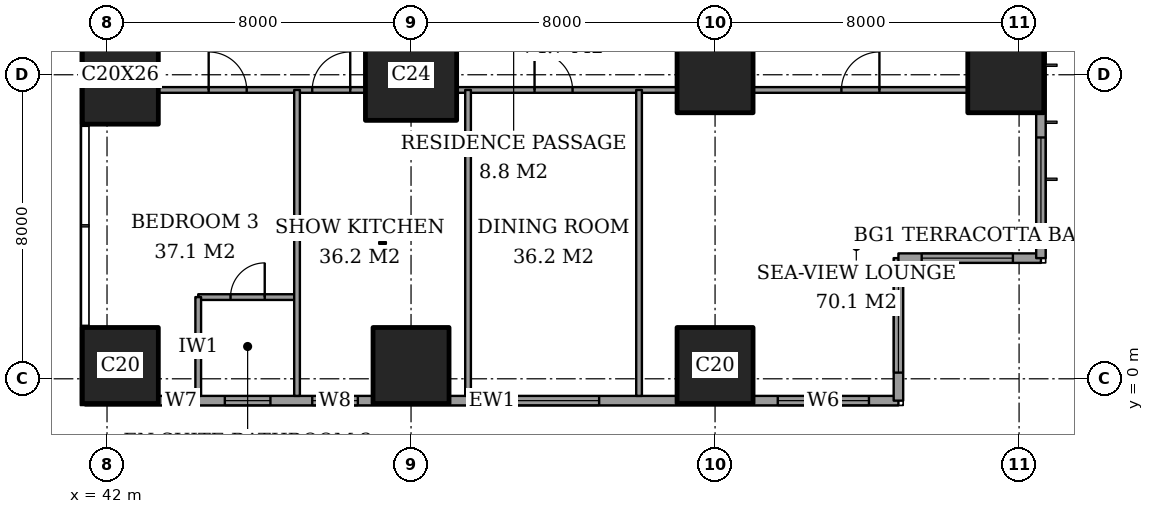
"""IFC4 building model, lengths in metres.
Left out: names, types, materials, properties, quantities, classifications, styles, units other than length and angle.
Written with IfcOpenShell. Run it as: python <this file> out.ifc"""

import sys

from ifc_helpers import new_model, si_unit, direction, frame, frame_2d, origin, origin_2d, place, context, subcontext, project, spatial, rectangle, extrude, element, fill, save


model = new_model("IFC4")
c1 = context("Model", 3, precision=1e-05, world=origin(), true_north=direction((0.0, 1.0)))
c2 = subcontext(c1, "Body", "Model", "MODEL_VIEW")
j1 = project(units=[si_unit("LENGTHUNIT", "METRE"), si_unit("PLANEANGLEUNIT", "RADIAN")], contexts=[c1])
p1 = place(None, origin())
s1 = spatial("IfcSite", under=j1, at=p1, CompositionType="ELEMENT")
p2 = place(p1, origin())
s2 = spatial("IfcBuilding", under=s1, at=p2, CompositionType="ELEMENT")
p3 = place(p2, frame((0.0, 0.0, 36.8)))
s3 = spatial("IfcBuildingStorey", under=s2, at=p3, CompositionType="ELEMENT", Elevation=36.8)
p4 = place(p3, frame((42.35, 0.35, 0.0), z_axis=(0.0, 0.0, 1.0), x_axis=(1.0, 0.0, 0.0)))
e1 = element("IfcColumn", 1, at=p4, inside=s3, PredefinedType="COLUMN", context=c2, shape_type="SweptSolid", body=[
    extrude(rectangle(XDim=2.0, YDim=2.0, at=origin_2d()), origin(), (0.0, 0.0, 1.0), 3.6),
])
p5 = place(p3, frame((42.35, 8.0, 0.0), z_axis=(0.0, 0.0, 1.0), x_axis=(1.0, 0.0, 0.0)))
e2 = element("IfcColumn", 2, at=p5, inside=s3, PredefinedType="COLUMN", context=c2, shape_type="SweptSolid", body=[
    extrude(rectangle(XDim=2.0, YDim=2.6, at=origin_2d()), origin(), (0.0, 0.0, 1.0), 3.6),
])
p6 = place(p3, frame((50.0, 0.35, 0.0), z_axis=(0.0, 0.0, 1.0), x_axis=(1.0, 0.0, 0.0)))
e3 = element("IfcColumn", 3, at=p6, inside=s3, PredefinedType="COLUMN", context=c2, shape_type="SweptSolid", body=[
    extrude(rectangle(XDim=2.0, YDim=2.0, at=origin_2d()), origin(), (0.0, 0.0, 1.0), 3.6),
])
p7 = place(p3, frame((50.0, 8.0, 0.0), z_axis=(0.0, 0.0, 1.0), x_axis=(1.0, 0.0, 0.0)))
e4 = element("IfcColumn", 4, at=p7, inside=s3, PredefinedType="COLUMN", context=c2, shape_type="SweptSolid", body=[
    extrude(rectangle(XDim=2.4, YDim=2.4, at=origin_2d()), origin(), (0.0, 0.0, 1.0), 3.6),
])
for number, where, z_axis, x_axis in (
    (5, (58.0, 0.35, 0.0), (0.0, 0.0, 1.0), (1.0, 0.0, 0.0)),
    (6, (58.0, 8.0, 0.0), (0.0, 0.0, 1.0), (1.0, 0.0, 0.0)),
    (7, (65.65, 8.0, 0.0), (0.0, 0.0, 1.0), (1.0, 0.0, 0.0)),
):
    element("IfcColumn", number, at=place(p3, frame(where, z_axis=z_axis, x_axis=x_axis)), inside=s3, PredefinedType="COLUMN", context=c2, shape_type="SweptSolid", body=[
        extrude(rectangle(XDim=2.0, YDim=2.0, at=origin_2d()), origin(), (0.0, 0.0, 1.0), 3.6),
    ])
p8 = place(p3, frame((41.425, -0.575, 0.0), z_axis=(0.0, 0.0, 1.0), x_axis=(1.0, 0.0, 0.0)))
e8 = element("IfcWall", 8, at=p8, inside=s3, PredefinedType="SOLIDWALL", context=c2, shape_type="SweptSolid", body=[
    extrude(rectangle(XDim=21.4, YDim=0.25, at=frame_2d((10.7, 0.0))), origin(), (0.0, 0.0, 1.0), 3.6),
])
p9 = place(p8, frame((2.225, 0.0, 0.6)))
e9 = element("IfcOpeningElement", 9, at=p9, cuts=e8, PredefinedType="OPENING", context=c2, shape_type="SweptSolid", body=[
    extrude(rectangle(XDim=0.6, YDim=2.0, at=frame_2d((0.3, 1.0))), frame((0.0, 0.135, 0.0), z_axis=(0.0, -1.0, 0.0), x_axis=(1.0, 0.0, 0.0)), (0.0, 0.0, 1.0), 0.27),
])
p10 = place(p8, frame((3.675, 0.0, 0.6)))
e10 = element("IfcOpeningElement", 10, at=p10, cuts=e8, PredefinedType="OPENING", context=c2, shape_type="SweptSolid", body=[
    extrude(rectangle(XDim=1.2, YDim=2.0, at=frame_2d((0.6, 1.0))), frame((0.0, 0.135, 0.0), z_axis=(0.0, -1.0, 0.0), x_axis=(1.0, 0.0, 0.0)), (0.0, 0.0, 1.0), 0.27),
])
p11 = place(p8, frame((5.975, 0.0, 0.6)))
e11 = element("IfcOpeningElement", 11, at=p11, cuts=e8, PredefinedType="OPENING", context=c2, shape_type="SweptSolid", body=[
    extrude(rectangle(XDim=1.2, YDim=2.0, at=frame_2d((0.6, 1.0))), frame((0.0, 0.135, 0.0), z_axis=(0.0, -1.0, 0.0), x_axis=(1.0, 0.0, 0.0)), (0.0, 0.0, 1.0), 0.27),
])
p12 = place(p8, frame((11.125, 0.0, 0.6)))
e12 = element("IfcOpeningElement", 12, at=p12, cuts=e8, PredefinedType="OPENING", context=c2, shape_type="SweptSolid", body=[
    extrude(rectangle(XDim=2.4, YDim=2.0, at=frame_2d((1.2, 1.0))), frame((0.0, 0.135, 0.0), z_axis=(0.0, -1.0, 0.0), x_axis=(1.0, 0.0, 0.0)), (0.0, 0.0, 1.0), 0.27),
])
p13 = place(p8, frame((18.225, 0.0, 0.6)))
e13 = element("IfcOpeningElement", 13, at=p13, cuts=e8, PredefinedType="OPENING", context=c2, shape_type="SweptSolid", body=[
    extrude(rectangle(XDim=2.4, YDim=2.0, at=frame_2d((1.2, 1.0))), frame((0.0, 0.135, 0.0), z_axis=(0.0, -1.0, 0.0), x_axis=(1.0, 0.0, 0.0)), (0.0, 0.0, 1.0), 0.27),
])
p14 = place(p3, frame((62.825, -0.575, 0.0), z_axis=(0.0, 0.0, 1.0), x_axis=(0.0, 1.0, 0.0)))
e14 = element("IfcWall", 14, at=p14, inside=s3, PredefinedType="SOLIDWALL", context=c2, shape_type="SweptSolid", body=[
    extrude(rectangle(XDim=3.75, YDim=0.25, at=frame_2d((1.875, 0.0))), origin(), (0.0, 0.0, 1.0), 3.6),
])
p15 = place(p14, frame((0.738, 0.0, 0.6)))
e15 = element("IfcOpeningElement", 15, at=p15, cuts=e14, PredefinedType="OPENING", context=c2, shape_type="SweptSolid", body=[
    extrude(rectangle(XDim=2.4, YDim=2.0, at=frame_2d((1.2, 1.0))), frame((0.0, 0.135, 0.0), z_axis=(0.0, -1.0, 0.0), x_axis=(1.0, 0.0, 0.0)), (0.0, 0.0, 1.0), 0.27),
])
p16 = place(p3, frame((62.825, 3.175, 0.0), z_axis=(0.0, 0.0, 1.0), x_axis=(1.0, 0.0, 0.0)))
e16 = element("IfcWall", 16, at=p16, inside=s3, PredefinedType="SOLIDWALL", context=c2, shape_type="SweptSolid", body=[
    extrude(rectangle(XDim=3.75, YDim=0.25, at=frame_2d((1.875, 0.0))), origin(), (0.0, 0.0, 1.0), 3.6),
])
p17 = place(p16, frame((0.613, 0.0, 0.6)))
e17 = element("IfcOpeningElement", 17, at=p17, cuts=e16, PredefinedType="OPENING", context=c2, shape_type="SweptSolid", body=[
    extrude(rectangle(XDim=2.4, YDim=2.0, at=frame_2d((1.2, 1.0))), frame((0.0, 0.135, 0.0), z_axis=(0.0, -1.0, 0.0), x_axis=(1.0, 0.0, 0.0)), (0.0, 0.0, 1.0), 0.27),
])
p18 = place(p3, frame((66.575, 3.175, 0.0), z_axis=(0.0, 0.0, 1.0), x_axis=(0.0, 1.0, 0.0)))
e18 = element("IfcWall", 18, at=p18, inside=s3, PredefinedType="SOLIDWALL", context=c2, shape_type="SweptSolid", body=[
    extrude(rectangle(XDim=41.65, YDim=0.25, at=frame_2d((20.825, 0.0))), origin(), (0.0, 0.0, 1.0), 3.6),
])
p19 = place(p18, frame((0.775, 0.0, 0.6)))
e19 = element("IfcOpeningElement", 19, at=p19, cuts=e18, PredefinedType="OPENING", context=c2, shape_type="SweptSolid", body=[
    extrude(rectangle(XDim=2.4, YDim=2.0, at=frame_2d((1.2, 1.0))), frame((0.0, 0.135, 0.0), z_axis=(0.0, -1.0, 0.0), x_axis=(1.0, 0.0, 0.0)), (0.0, 0.0, 1.0), 0.27),
])
p20 = place(p18, frame((6.1, 0.0, 0.6)))
e20 = element("IfcOpeningElement", 20, at=p20, cuts=e18, PredefinedType="OPENING", context=c2, shape_type="SweptSolid", body=[
    extrude(rectangle(XDim=1.2, YDim=2.0, at=frame_2d((0.6, 1.0))), frame((0.0, 0.135, 0.0), z_axis=(0.0, -1.0, 0.0), x_axis=(1.0, 0.0, 0.0)), (0.0, 0.0, 1.0), 0.27),
])
p21 = place(p18, frame((8.275, 0.0, 0.6)))
e21 = element("IfcOpeningElement", 21, at=p21, cuts=e18, PredefinedType="OPENING", context=c2, shape_type="SweptSolid", body=[
    extrude(rectangle(XDim=2.4, YDim=2.0, at=frame_2d((1.2, 1.0))), frame((0.0, 0.135, 0.0), z_axis=(0.0, -1.0, 0.0), x_axis=(1.0, 0.0, 0.0)), (0.0, 0.0, 1.0), 0.27),
])
p22 = place(p18, frame((15.775, 0.0, 0.6)))
e22 = element("IfcOpeningElement", 22, at=p22, cuts=e18, PredefinedType="OPENING", context=c2, shape_type="SweptSolid", body=[
    extrude(rectangle(XDim=2.4, YDim=2.0, at=frame_2d((1.2, 1.0))), frame((0.0, 0.135, 0.0), z_axis=(0.0, -1.0, 0.0), x_axis=(1.0, 0.0, 0.0)), (0.0, 0.0, 1.0), 0.27),
])
p23 = place(p18, frame((23.475, 0.0, 0.6)))
e23 = element("IfcOpeningElement", 23, at=p23, cuts=e18, PredefinedType="OPENING", context=c2, shape_type="SweptSolid", body=[
    extrude(rectangle(XDim=2.4, YDim=2.0, at=frame_2d((1.2, 1.0))), frame((0.0, 0.135, 0.0), z_axis=(0.0, -1.0, 0.0), x_axis=(1.0, 0.0, 0.0)), (0.0, 0.0, 1.0), 0.27),
])
p24 = place(p18, frame((30.975, 0.0, 0.6)))
e24 = element("IfcOpeningElement", 24, at=p24, cuts=e18, PredefinedType="OPENING", context=c2, shape_type="SweptSolid", body=[
    extrude(rectangle(XDim=2.4, YDim=2.0, at=frame_2d((1.2, 1.0))), frame((0.0, 0.135, 0.0), z_axis=(0.0, -1.0, 0.0), x_axis=(1.0, 0.0, 0.0)), (0.0, 0.0, 1.0), 0.27),
])
p25 = place(p18, frame((34.5, 0.0, 0.6)))
e25 = element("IfcOpeningElement", 25, at=p25, cuts=e18, PredefinedType="OPENING", context=c2, shape_type="SweptSolid", body=[
    extrude(rectangle(XDim=1.2, YDim=2.0, at=frame_2d((0.6, 1.0))), frame((0.0, 0.135, 0.0), z_axis=(0.0, -1.0, 0.0), x_axis=(1.0, 0.0, 0.0)), (0.0, 0.0, 1.0), 0.27),
])
p26 = place(p18, frame((38.475, 0.0, 0.6)))
e26 = element("IfcOpeningElement", 26, at=p26, cuts=e18, PredefinedType="OPENING", context=c2, shape_type="SweptSolid", body=[
    extrude(rectangle(XDim=2.4, YDim=2.0, at=frame_2d((1.2, 1.0))), frame((0.0, 0.135, 0.0), z_axis=(0.0, -1.0, 0.0), x_axis=(1.0, 0.0, 0.0)), (0.0, 0.0, 1.0), 0.27),
])
p27 = place(p3, frame((44.4, 2.15, 0.0), z_axis=(0.0, 0.0, 1.0), x_axis=(1.0, 0.0, 0.0)))
e27 = element("IfcWall", 27, at=p27, inside=s3, PredefinedType="PARTITIONING", context=c2, shape_type="SweptSolid", body=[
    extrude(rectangle(XDim=2.6, YDim=0.15, at=frame_2d((1.3, 0.0))), origin(), (0.0, 0.0, 1.0), 3.35),
])
p28 = place(p27, frame((0.85, 0.0, 0.0)))
e28 = element("IfcOpeningElement", 28, at=p28, cuts=e27, PredefinedType="OPENING", context=c2, shape_type="SweptSolid", body=[
    extrude(rectangle(XDim=0.9, YDim=2.1, at=frame_2d((0.45, 1.05))), frame((0.0, 0.085, 0.0), z_axis=(0.0, -1.0, 0.0), x_axis=(1.0, 0.0, 0.0)), (0.0, 0.0, 1.0), 0.17),
])
p29 = place(p3, frame((43.35, 7.6, 0.0), z_axis=(0.0, 0.0, 1.0), x_axis=(1.0, 0.0, 0.0)))
e29 = element("IfcWall", 29, at=p29, inside=s3, PredefinedType="PARTITIONING", context=c2, shape_type="SweptSolid", body=[
    extrude(rectangle(XDim=5.45, YDim=0.15, at=frame_2d((2.725, 0.0))), origin(), (0.0, 0.0, 1.0), 3.35),
])
p30 = place(p29, frame((4.05, 0.0, 0.0)))
e30 = element("IfcOpeningElement", 30, at=p30, cuts=e29, PredefinedType="OPENING", context=c2, shape_type="SweptSolid", body=[
    extrude(rectangle(XDim=1.0, YDim=2.1, at=frame_2d((0.5, 1.05))), frame((0.0, 0.085, 0.0), z_axis=(0.0, -1.0, 0.0), x_axis=(1.0, 0.0, 0.0)), (0.0, 0.0, 1.0), 0.17),
])
p31 = place(p29, frame((1.325, 0.0, 0.0)))
e31 = element("IfcOpeningElement", 31, at=p31, cuts=e29, PredefinedType="OPENING", context=c2, shape_type="SweptSolid", body=[
    extrude(rectangle(XDim=1.0, YDim=2.1, at=frame_2d((0.5, 1.05))), frame((0.0, 0.085, 0.0), z_axis=(0.0, -1.0, 0.0), x_axis=(1.0, 0.0, 0.0)), (0.0, 0.0, 1.0), 0.17),
])
p32 = place(p3, frame((51.2, 7.6, 0.0), z_axis=(0.0, 0.0, 1.0), x_axis=(1.0, 0.0, 0.0)))
e32 = element("IfcWall", 32, at=p32, inside=s3, PredefinedType="PARTITIONING", context=c2, shape_type="SweptSolid", body=[
    extrude(rectangle(XDim=5.8, YDim=0.15, at=frame_2d((2.9, 0.0))), origin(), (0.0, 0.0, 1.0), 3.35),
])
p33 = place(p32, frame((2.05, 0.0, 0.0)))
e33 = element("IfcOpeningElement", 33, at=p33, cuts=e32, PredefinedType="OPENING", context=c2, shape_type="SweptSolid", body=[
    extrude(rectangle(XDim=1.0, YDim=2.1, at=frame_2d((0.5, 1.05))), frame((0.0, 0.085, 0.0), z_axis=(0.0, -1.0, 0.0), x_axis=(1.0, 0.0, 0.0)), (0.0, 0.0, 1.0), 0.17),
])
p34 = place(p3, frame((59.0, 7.6, 0.0), z_axis=(0.0, 0.0, 1.0), x_axis=(1.0, 0.0, 0.0)))
e34 = element("IfcWall", 34, at=p34, inside=s3, PredefinedType="PARTITIONING", context=c2, shape_type="SweptSolid", body=[
    extrude(rectangle(XDim=5.65, YDim=0.15, at=frame_2d((2.825, 0.0))), origin(), (0.0, 0.0, 1.0), 3.35),
])
p35 = place(p34, frame((2.325, 0.0, 0.0)))
e35 = element("IfcOpeningElement", 35, at=p35, cuts=e34, PredefinedType="OPENING", context=c2, shape_type="SweptSolid", body=[
    extrude(rectangle(XDim=1.0, YDim=2.1, at=frame_2d((0.5, 1.05))), frame((0.0, 0.085, 0.0), z_axis=(0.0, -1.0, 0.0), x_axis=(1.0, 0.0, 0.0)), (0.0, 0.0, 1.0), 0.17),
])
p36 = place(p3, frame((44.4, -0.45, 0.0), z_axis=(0.0, 0.0, 1.0), x_axis=(0.0, 1.0, 0.0)))
e36 = element("IfcWall", 36, at=p36, inside=s3, PredefinedType="PARTITIONING", context=c2, shape_type="SweptSolid", body=[
    extrude(rectangle(XDim=2.6, YDim=0.15, at=frame_2d((1.3, 0.0))), origin(), (0.0, 0.0, 1.0), 3.35),
])
for number, where, z_axis, x_axis in (
    (37, (47.0, -0.45, 0.0), (0.0, 0.0, 1.0), (0.0, 1.0, 0.0)),
    (38, (51.5, -0.45, 0.0), (0.0, 0.0, 1.0), (0.0, 1.0, 0.0)),
    (39, (56.0, -0.45, 0.0), (0.0, 0.0, 1.0), (0.0, 1.0, 0.0)),
):
    element("IfcWall", number, at=place(p3, frame(where, z_axis=z_axis, x_axis=x_axis)), inside=s3, PredefinedType="PARTITIONING", context=c2, shape_type="SweptSolid", body=[
        extrude(rectangle(XDim=8.05, YDim=0.15, at=frame_2d((4.025, 0.0))), origin(), (0.0, 0.0, 1.0), 3.35),
    ])
p37 = place(p9, origin())
e40 = element("IfcWindow", 40, at=p37, inside=s3, PartitioningType="SINGLE_PANEL", PredefinedType="WINDOW", context=c2, shape_type="SweptSolid", body=[
    extrude(rectangle(XDim=0.6, YDim=2.0, at=frame_2d((0.3, 1.0))), frame((0.0, 0.03, 0.0), z_axis=(0.0, -1.0, 0.0), x_axis=(1.0, 0.0, 0.0)), (0.0, 0.0, 1.0), 0.06),
])
fill(e9, e40)
p38 = place(p10, origin())
e41 = element("IfcWindow", 41, at=p38, inside=s3, PartitioningType="SINGLE_PANEL", PredefinedType="WINDOW", context=c2, shape_type="SweptSolid", body=[
    extrude(rectangle(XDim=1.2, YDim=2.0, at=frame_2d((0.6, 1.0))), frame((0.0, 0.03, 0.0), z_axis=(0.0, -1.0, 0.0), x_axis=(1.0, 0.0, 0.0)), (0.0, 0.0, 1.0), 0.06),
])
fill(e10, e41)
p39 = place(p11, origin())
e42 = element("IfcWindow", 42, at=p39, inside=s3, PartitioningType="SINGLE_PANEL", PredefinedType="WINDOW", context=c2, shape_type="SweptSolid", body=[
    extrude(rectangle(XDim=1.2, YDim=2.0, at=frame_2d((0.6, 1.0))), frame((0.0, 0.03, 0.0), z_axis=(0.0, -1.0, 0.0), x_axis=(1.0, 0.0, 0.0)), (0.0, 0.0, 1.0), 0.06),
])
fill(e11, e42)
p40 = place(p12, origin())
e43 = element("IfcWindow", 43, at=p40, inside=s3, PartitioningType="SINGLE_PANEL", PredefinedType="WINDOW", context=c2, shape_type="SweptSolid", body=[
    extrude(rectangle(XDim=2.4, YDim=2.0, at=frame_2d((1.2, 1.0))), frame((0.0, 0.03, 0.0), z_axis=(0.0, -1.0, 0.0), x_axis=(1.0, 0.0, 0.0)), (0.0, 0.0, 1.0), 0.06),
])
fill(e12, e43)
p41 = place(p13, origin())
e44 = element("IfcWindow", 44, at=p41, inside=s3, PartitioningType="SINGLE_PANEL", PredefinedType="WINDOW", context=c2, shape_type="SweptSolid", body=[
    extrude(rectangle(XDim=2.4, YDim=2.0, at=frame_2d((1.2, 1.0))), frame((0.0, 0.03, 0.0), z_axis=(0.0, -1.0, 0.0), x_axis=(1.0, 0.0, 0.0)), (0.0, 0.0, 1.0), 0.06),
])
fill(e13, e44)
p42 = place(p15, origin())
e45 = element("IfcWindow", 45, at=p42, inside=s3, PartitioningType="SINGLE_PANEL", PredefinedType="WINDOW", context=c2, shape_type="SweptSolid", body=[
    extrude(rectangle(XDim=2.4, YDim=2.0, at=frame_2d((1.2, 1.0))), frame((0.0, 0.03, 0.0), z_axis=(0.0, -1.0, 0.0), x_axis=(1.0, 0.0, 0.0)), (0.0, 0.0, 1.0), 0.06),
])
fill(e15, e45)
p43 = place(p17, origin())
e46 = element("IfcWindow", 46, at=p43, inside=s3, PartitioningType="SINGLE_PANEL", PredefinedType="WINDOW", context=c2, shape_type="SweptSolid", body=[
    extrude(rectangle(XDim=2.4, YDim=2.0, at=frame_2d((1.2, 1.0))), frame((0.0, 0.03, 0.0), z_axis=(0.0, -1.0, 0.0), x_axis=(1.0, 0.0, 0.0)), (0.0, 0.0, 1.0), 0.06),
])
fill(e17, e46)
p44 = place(p19, origin())
e47 = element("IfcWindow", 47, at=p44, inside=s3, PartitioningType="SINGLE_PANEL", PredefinedType="WINDOW", context=c2, shape_type="SweptSolid", body=[
    extrude(rectangle(XDim=2.4, YDim=2.0, at=frame_2d((1.2, 1.0))), frame((0.0, 0.03, 0.0), z_axis=(0.0, -1.0, 0.0), x_axis=(1.0, 0.0, 0.0)), (0.0, 0.0, 1.0), 0.06),
])
fill(e19, e47)
p45 = place(p35, origin())
e48 = element("IfcDoor", 48, at=p45, inside=s3, OperationType="SINGLE_SWING_LEFT", PredefinedType="DOOR", context=c2, shape_type="SweptSolid", body=[
    extrude(rectangle(XDim=1.0, YDim=2.1, at=frame_2d((0.5, 1.05))), frame((0.0, 0.025, 0.0), z_axis=(0.0, -1.0, 0.0), x_axis=(1.0, 0.0, 0.0)), (0.0, 0.0, 1.0), 0.05),
])
fill(e35, e48)
p46 = place(p33, origin())
e49 = element("IfcDoor", 49, at=p46, inside=s3, OperationType="SINGLE_SWING_RIGHT", PredefinedType="DOOR", context=c2, shape_type="SweptSolid", body=[
    extrude(rectangle(XDim=1.0, YDim=2.1, at=frame_2d((0.5, 1.05))), frame((0.0, 0.025, 0.0), z_axis=(0.0, -1.0, 0.0), x_axis=(1.0, 0.0, 0.0)), (0.0, 0.0, 1.0), 0.05),
])
fill(e33, e49)
p47 = place(p30, origin())
e50 = element("IfcDoor", 50, at=p47, inside=s3, OperationType="SINGLE_SWING_LEFT", PredefinedType="DOOR", context=c2, shape_type="SweptSolid", body=[
    extrude(rectangle(XDim=1.0, YDim=2.1, at=frame_2d((0.5, 1.05))), frame((0.0, 0.025, 0.0), z_axis=(0.0, -1.0, 0.0), x_axis=(1.0, 0.0, 0.0)), (0.0, 0.0, 1.0), 0.05),
])
fill(e30, e50)
p48 = place(p28, origin())
e51 = element("IfcDoor", 51, at=p48, inside=s3, OperationType="SINGLE_SWING_LEFT", PredefinedType="DOOR", context=c2, shape_type="SweptSolid", body=[
    extrude(rectangle(XDim=0.9, YDim=2.1, at=frame_2d((0.45, 1.05))), frame((0.0, 0.025, 0.0), z_axis=(0.0, -1.0, 0.0), x_axis=(1.0, 0.0, 0.0)), (0.0, 0.0, 1.0), 0.05),
])
fill(e28, e51)
p49 = place(p31, origin())
e52 = element("IfcDoor", 52, at=p49, inside=s3, OperationType="SINGLE_SWING_RIGHT", PredefinedType="DOOR", context=c2, shape_type="SweptSolid", body=[
    extrude(rectangle(XDim=1.0, YDim=2.1, at=frame_2d((0.5, 1.05))), frame((0.0, 0.025, 0.0), z_axis=(0.0, -1.0, 0.0), x_axis=(1.0, 0.0, 0.0)), (0.0, 0.0, 1.0), 0.05),
])
fill(e31, e52)
save(model, sys.argv[1])
